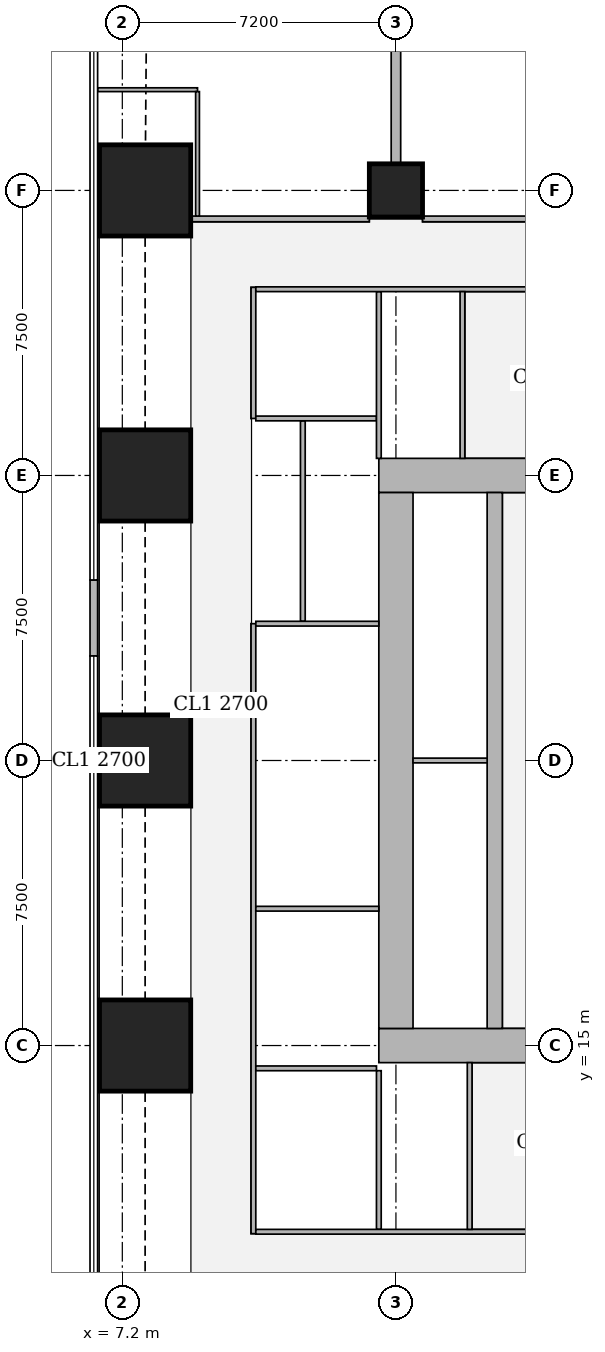
"""IFC4 building model, lengths in metres.
Left out: names, types, materials, properties, quantities, classifications, styles, units other than length and angle.
Written with IfcOpenShell. Run it as: python <this file> out.ifc"""

import sys

from ifc_helpers import new_model, si_unit, direction, frame, frame_2d, origin, origin_2d, place, context, subcontext, project, spatial, rectangle, extrude, element, fill, save


model = new_model("IFC4")
c1 = context("Model", 3, precision=1e-05, world=origin(), true_north=direction((0.0, 1.0)))
c2 = subcontext(c1, "Body", "Model", "MODEL_VIEW")
j1 = project(units=[si_unit("LENGTHUNIT", "METRE"), si_unit("PLANEANGLEUNIT", "RADIAN")], contexts=[c1])
p1 = place(None, origin())
s1 = spatial("IfcSite", under=j1, at=p1, CompositionType="ELEMENT")
p2 = place(p1, origin())
s2 = spatial("IfcBuilding", under=s1, at=p2, CompositionType="ELEMENT")
p3 = place(p2, frame((0.0, 0.0, 193.7)))
s3 = spatial("IfcBuildingStorey", under=s2, at=p3, CompositionType="ELEMENT", Elevation=193.7)
for number, where, z_axis, x_axis in (
    (1, (7.8, 15.0, 0.0), (0.0, 0.0, 1.0), (1.0, 0.0, 0.0)),
    (2, (7.8, 22.5, 0.0), (0.0, 0.0, 1.0), (1.0, 0.0, 0.0)),
    (3, (7.8, 30.0, 0.0), (0.0, 0.0, 1.0), (1.0, 0.0, 0.0)),
    (4, (7.8, 37.5, 0.0), (0.0, 0.0, 1.0), (1.0, 0.0, 0.0)),
):
    element("IfcColumn", number, at=place(p3, frame(where, z_axis=z_axis, x_axis=x_axis)), inside=s3, PredefinedType="COLUMN", context=c2, shape_type="SweptSolid", body=[
        extrude(rectangle(XDim=2.4, YDim=2.4, at=origin_2d()), origin(), (0.0, 0.0, 1.0), 3.75),
    ])
p4 = place(p3, frame((14.4, 37.5, 0.0), z_axis=(0.0, 0.0, 1.0), x_axis=(1.0, 0.0, 0.0)))
e5 = element("IfcColumn", 5, at=p4, inside=s3, PredefinedType="COLUMN", context=c2, shape_type="SweptSolid", body=[
    extrude(rectangle(XDim=1.4, YDim=1.4, at=origin_2d()), origin(), (0.0, 0.0, 1.0), 3.75),
])
p5 = place(p3, frame((13.95, 15.0, 0.0), z_axis=(0.0, 0.0, 1.0), x_axis=(1.0, 0.0, 0.0)))
e6 = element("IfcWall", 6, at=p5, inside=s3, PredefinedType="SHEAR", context=c2, shape_type="SweptSolid", body=[
    extrude(rectangle(XDim=15.3, YDim=0.9, at=frame_2d((7.65, 0.0))), origin(), (0.0, 0.0, 1.0), 3.75),
])
p6 = place(p5, frame((4.45, 0.0, 0.0)))
e7 = element("IfcOpeningElement", 7, at=p6, cuts=e6, PredefinedType="OPENING", context=c2, shape_type="SweptSolid", body=[
    extrude(rectangle(XDim=1.8, YDim=2.1, at=frame_2d((0.9, 1.05))), frame((0.0, 0.46, 0.0), z_axis=(0.0, -1.0, 0.0), x_axis=(1.0, 0.0, 0.0)), (0.0, 0.0, 1.0), 0.92),
])
p7 = place(p5, frame((10.7, 0.0, 0.0)))
e8 = element("IfcOpeningElement", 8, at=p7, cuts=e6, PredefinedType="OPENING", context=c2, shape_type="SweptSolid", body=[
    extrude(rectangle(XDim=1.1, YDim=2.1, at=frame_2d((0.55, 1.05))), frame((0.0, 0.46, 0.0), z_axis=(0.0, -1.0, 0.0), x_axis=(1.0, 0.0, 0.0)), (0.0, 0.0, 1.0), 0.92),
])
p8 = place(p3, frame((13.95, 30.0, 0.0), z_axis=(0.0, 0.0, 1.0), x_axis=(1.0, 0.0, 0.0)))
e9 = element("IfcWall", 9, at=p8, inside=s3, PredefinedType="SHEAR", context=c2, shape_type="SweptSolid", body=[
    extrude(rectangle(XDim=15.3, YDim=0.9, at=frame_2d((7.65, 0.0))), origin(), (0.0, 0.0, 1.0), 3.75),
])
p9 = place(p8, frame((4.45, 0.0, 0.0)))
e10 = element("IfcOpeningElement", 10, at=p9, cuts=e9, PredefinedType="OPENING", context=c2, shape_type="SweptSolid", body=[
    extrude(rectangle(XDim=1.8, YDim=2.1, at=frame_2d((0.9, 1.05))), frame((0.0, 0.46, 0.0), z_axis=(0.0, -1.0, 0.0), x_axis=(1.0, 0.0, 0.0)), (0.0, 0.0, 1.0), 0.92),
])
p10 = place(p8, frame((10.7, 0.0, 0.0)))
e11 = element("IfcOpeningElement", 11, at=p10, cuts=e9, PredefinedType="OPENING", context=c2, shape_type="SweptSolid", body=[
    extrude(rectangle(XDim=1.1, YDim=2.1, at=frame_2d((0.55, 1.05))), frame((0.0, 0.46, 0.0), z_axis=(0.0, -1.0, 0.0), x_axis=(1.0, 0.0, 0.0)), (0.0, 0.0, 1.0), 0.92),
])
p11 = place(p3, frame((14.4, 15.45, 0.0), z_axis=(0.0, 0.0, 1.0), x_axis=(0.0, 1.0, 0.0)))
e12 = element("IfcWall", 12, at=p11, inside=s3, PredefinedType="SHEAR", context=c2, shape_type="SweptSolid", body=[
    extrude(rectangle(XDim=14.1, YDim=0.9, at=frame_2d((7.05, 0.0))), origin(), (0.0, 0.0, 1.0), 3.75),
])
p12 = place(p3, frame((17.0, 15.45, 0.0), z_axis=(0.0, 0.0, 1.0), x_axis=(0.0, 1.0, 0.0)))
e13 = element("IfcWall", 13, at=p12, inside=s3, PredefinedType="SHEAR", context=c2, shape_type="SweptSolid", body=[
    extrude(rectangle(XDim=14.1, YDim=0.4, at=frame_2d((7.05, 0.0))), origin(), (0.0, 0.0, 1.0), 3.75),
])
p13 = place(p12, frame((0.925, 0.0, 0.0)))
e14 = element("IfcOpeningElement", 14, at=p13, cuts=e13, PredefinedType="OPENING", context=c2, shape_type="SweptSolid", body=[
    extrude(rectangle(XDim=1.0, YDim=2.1, at=frame_2d((0.5, 1.05))), frame((0.0, 0.21, 0.0), z_axis=(0.0, -1.0, 0.0), x_axis=(1.0, 0.0, 0.0)), (0.0, 0.0, 1.0), 0.42),
])
p14 = place(p12, frame((4.675, 0.0, 0.0)))
e15 = element("IfcOpeningElement", 15, at=p14, cuts=e13, PredefinedType="OPENING", context=c2, shape_type="SweptSolid", body=[
    extrude(rectangle(XDim=1.0, YDim=2.1, at=frame_2d((0.5, 1.05))), frame((0.0, 0.21, 0.0), z_axis=(0.0, -1.0, 0.0), x_axis=(1.0, 0.0, 0.0)), (0.0, 0.0, 1.0), 0.42),
])
p15 = place(p12, frame((8.425, 0.0, 0.0)))
e16 = element("IfcOpeningElement", 16, at=p15, cuts=e13, PredefinedType="OPENING", context=c2, shape_type="SweptSolid", body=[
    extrude(rectangle(XDim=1.0, YDim=2.1, at=frame_2d((0.5, 1.05))), frame((0.0, 0.21, 0.0), z_axis=(0.0, -1.0, 0.0), x_axis=(1.0, 0.0, 0.0)), (0.0, 0.0, 1.0), 0.42),
])
p16 = place(p12, frame((12.175, 0.0, 0.0)))
e17 = element("IfcOpeningElement", 17, at=p16, cuts=e13, PredefinedType="OPENING", context=c2, shape_type="SweptSolid", body=[
    extrude(rectangle(XDim=1.0, YDim=2.1, at=frame_2d((0.5, 1.05))), frame((0.0, 0.21, 0.0), z_axis=(0.0, -1.0, 0.0), x_axis=(1.0, 0.0, 0.0)), (0.0, 0.0, 1.0), 0.42),
])
p17 = place(p3, frame((6.45, 27.25, 0.0), z_axis=(0.0, 0.0, 1.0), x_axis=(0.0, -1.0, 0.0)))
e18 = element("IfcWall", 18, at=p17, inside=s3, PredefinedType="SOLIDWALL", context=c2, shape_type="SweptSolid", body=[
    extrude(rectangle(XDim=2.0, YDim=0.2, at=frame_2d((1.0, 0.0))), origin(), (0.0, 0.0, 1.0), 3.5),
])
p18 = place(p17, frame((0.5, 0.0, 0.0)))
e19 = element("IfcOpeningElement", 19, at=p18, cuts=e18, PredefinedType="OPENING", context=c2, shape_type="SweptSolid", body=[
    extrude(rectangle(XDim=1.0, YDim=2.4, at=frame_2d((0.5, 1.2))), frame((0.0, 0.11, 0.0), z_axis=(0.0, -1.0, 0.0), x_axis=(1.0, 0.0, 0.0)), (0.0, 0.0, 1.0), 0.22),
])
p19 = place(p3, frame((9.001, 36.75, 0.0), z_axis=(0.0, 0.0, 1.0), x_axis=(1.0, 0.0, 0.0)))
e20 = element("IfcWall", 20, at=p19, inside=s3, PredefinedType="SOLIDWALL", context=c2, shape_type="SweptSolid", body=[
    extrude(rectangle(XDim=4.698, YDim=0.15, at=frame_2d((2.349, 0.0))), origin(), (0.0, 0.0, 1.0), 3.5),
])
p20 = place(p19, frame((0.353, 0.0, 0.0)))
e21 = element("IfcOpeningElement", 21, at=p20, cuts=e20, PredefinedType="OPENING", context=c2, shape_type="SweptSolid", body=[
    extrude(rectangle(XDim=1.0, YDim=2.1, at=frame_2d((0.5, 1.05))), frame((0.0, 0.085, 0.0), z_axis=(0.0, -1.0, 0.0), x_axis=(1.0, 0.0, 0.0)), (0.0, 0.0, 1.0), 0.17),
])
p21 = place(p3, frame((15.101, 36.75, 0.0), z_axis=(0.0, 0.0, 1.0), x_axis=(1.0, 0.0, 0.0)))
e22 = element("IfcWall", 22, at=p21, inside=s3, PredefinedType="SOLIDWALL", context=c2, shape_type="SweptSolid", body=[
    extrude(rectangle(XDim=5.798, YDim=0.15, at=frame_2d((2.899, 0.0))), origin(), (0.0, 0.0, 1.0), 3.5),
])
p22 = place(p21, frame((0.799, 0.0, 0.0)))
e23 = element("IfcOpeningElement", 23, at=p22, cuts=e22, PredefinedType="OPENING", context=c2, shape_type="SweptSolid", body=[
    extrude(rectangle(XDim=1.0, YDim=2.1, at=frame_2d((0.5, 1.05))), frame((0.0, 0.085, 0.0), z_axis=(0.0, -1.0, 0.0), x_axis=(1.0, 0.0, 0.0)), (0.0, 0.0, 1.0), 0.17),
])
p23 = place(p3, frame((6.55, 40.15, 0.0), z_axis=(0.0, 0.0, 1.0), x_axis=(1.0, 0.0, 0.0)))
e24 = element("IfcWall", 24, at=p23, inside=s3, PredefinedType="PARTITIONING", context=c2, shape_type="SweptSolid", body=[
    extrude(rectangle(XDim=2.629, YDim=0.1, at=frame_2d((1.314, 0.0))), origin(), (0.0, 0.0, 1.0), 2.05),
])
p24 = place(p3, frame((9.179, 36.825, 0.0), z_axis=(0.0, 0.0, 1.0), x_axis=(0.0, 1.0, 0.0)))
e25 = element("IfcWall", 25, at=p24, inside=s3, PredefinedType="PARTITIONING", context=c2, shape_type="SweptSolid", body=[
    extrude(rectangle(XDim=3.275, YDim=0.1, at=frame_2d((1.638, 0.0))), origin(), (0.0, 0.0, 1.0), 3.5),
])
p25 = place(p24, frame((2.225, 0.0, 0.0)))
e26 = element("IfcOpeningElement", 26, at=p25, cuts=e25, PredefinedType="OPENING", context=c2, shape_type="SweptSolid", body=[
    extrude(rectangle(XDim=0.9, YDim=2.1, at=frame_2d((0.45, 1.05))), frame((0.0, 0.06, 0.0), z_axis=(0.0, -1.0, 0.0), x_axis=(1.0, 0.0, 0.0)), (0.0, 0.0, 1.0), 0.12),
])
p26 = place(p3, frame((14.4, 38.201, 0.0), z_axis=(0.0, 0.0, 1.0), x_axis=(0.0, 1.0, 0.0)))
e27 = element("IfcWall", 27, at=p26, inside=s3, PredefinedType="SOLIDWALL", context=c2, shape_type="SweptSolid", body=[
    extrude(rectangle(XDim=3.149, YDim=0.25, at=frame_2d((1.575, 0.0))), origin(), (0.0, 0.0, 1.0), 3.5),
])
p27 = place(p3, frame((10.65, 10.05, 0.0), z_axis=(0.0, 0.0, 1.0), x_axis=(0.0, 1.0, 0.0)))
e28 = element("IfcWall", 28, at=p27, inside=s3, PredefinedType="PARTITIONING", context=c2, shape_type="SweptSolid", body=[
    extrude(rectangle(XDim=16.05, YDim=0.125, at=frame_2d((8.025, 0.0))), origin(), (0.0, 0.0, 1.0), 3.5),
])
p28 = place(p27, frame((1.675, 0.0, 0.0)))
e29 = element("IfcOpeningElement", 29, at=p28, cuts=e28, PredefinedType="OPENING", context=c2, shape_type="SweptSolid", body=[
    extrude(rectangle(XDim=1.0, YDim=2.1, at=frame_2d((0.5, 1.05))), frame((0.0, 0.073, 0.0), z_axis=(0.0, -1.0, 0.0), x_axis=(1.0, 0.0, 0.0)), (0.0, 0.0, 1.0), 0.145),
])
p29 = place(p27, frame((5.95, 0.0, 0.0)))
e30 = element("IfcOpeningElement", 30, at=p29, cuts=e28, PredefinedType="OPENING", context=c2, shape_type="SweptSolid", body=[
    extrude(rectangle(XDim=1.0, YDim=2.1, at=frame_2d((0.5, 1.05))), frame((0.0, 0.073, 0.0), z_axis=(0.0, -1.0, 0.0), x_axis=(1.0, 0.0, 0.0)), (0.0, 0.0, 1.0), 0.145),
])
p30 = place(p27, frame((11.8, 0.0, 0.0)))
e31 = element("IfcOpeningElement", 31, at=p30, cuts=e28, PredefinedType="OPENING", context=c2, shape_type="SweptSolid", body=[
    extrude(rectangle(XDim=1.0, YDim=2.1, at=frame_2d((0.5, 1.05))), frame((0.0, 0.073, 0.0), z_axis=(0.0, -1.0, 0.0), x_axis=(1.0, 0.0, 0.0)), (0.0, 0.0, 1.0), 0.145),
])
p31 = place(p3, frame((10.65, 31.5, 0.0), z_axis=(0.0, 0.0, 1.0), x_axis=(0.0, 1.0, 0.0)))
e32 = element("IfcWall", 32, at=p31, inside=s3, PredefinedType="PARTITIONING", context=c2, shape_type="SweptSolid", body=[
    extrude(rectangle(XDim=3.45, YDim=0.125, at=frame_2d((1.725, 0.0))), origin(), (0.0, 0.0, 1.0), 3.5),
])
p32 = place(p31, frame((1.225, 0.0, 0.0)))
e33 = element("IfcOpeningElement", 33, at=p32, cuts=e32, PredefinedType="OPENING", context=c2, shape_type="SweptSolid", body=[
    extrude(rectangle(XDim=1.0, YDim=2.1, at=frame_2d((0.5, 1.05))), frame((0.0, 0.073, 0.0), z_axis=(0.0, -1.0, 0.0), x_axis=(1.0, 0.0, 0.0)), (0.0, 0.0, 1.0), 0.145),
])
p33 = place(p3, frame((11.95, 26.163, 0.0), z_axis=(0.0, 0.0, 1.0), x_axis=(0.0, 1.0, 0.0)))
e34 = element("IfcWall", 34, at=p33, inside=s3, PredefinedType="PARTITIONING", context=c2, shape_type="SweptSolid", body=[
    extrude(rectangle(XDim=5.275, YDim=0.125, at=frame_2d((2.637, 0.0))), origin(), (0.0, 0.0, 1.0), 3.5),
])
p34 = place(p33, frame((2.137, 0.0, 0.0)))
e35 = element("IfcOpeningElement", 35, at=p34, cuts=e34, PredefinedType="OPENING", context=c2, shape_type="SweptSolid", body=[
    extrude(rectangle(XDim=1.0, YDim=2.1, at=frame_2d((0.5, 1.05))), frame((0.0, 0.073, 0.0), z_axis=(0.0, -1.0, 0.0), x_axis=(1.0, 0.0, 0.0)), (0.0, 0.0, 1.0), 0.145),
])
p35 = place(p3, frame((10.713, 14.4, 0.0), z_axis=(0.0, 0.0, 1.0), x_axis=(1.0, 0.0, 0.0)))
e36 = element("IfcWall", 36, at=p35, inside=s3, PredefinedType="PARTITIONING", context=c2, shape_type="SweptSolid", body=[
    extrude(rectangle(XDim=3.175, YDim=0.125, at=frame_2d((1.587, 0.0))), origin(), (0.0, 0.0, 1.0), 3.5),
])
for number, where, z_axis, x_axis in (
    (37, (10.713, 18.6, 0.0), (0.0, 0.0, 1.0), (1.0, 0.0, 0.0)),
    (38, (10.713, 26.1, 0.0), (0.0, 0.0, 1.0), (1.0, 0.0, 0.0)),
):
    element("IfcWall", number, at=place(p3, frame(where, z_axis=z_axis, x_axis=x_axis)), inside=s3, PredefinedType="PARTITIONING", context=c2, shape_type="SweptSolid", body=[
        extrude(rectangle(XDim=3.237, YDim=0.125, at=frame_2d((1.619, 0.0))), origin(), (0.0, 0.0, 1.0), 3.5),
    ])
p36 = place(p3, frame((10.713, 31.5, 0.0), z_axis=(0.0, 0.0, 1.0), x_axis=(1.0, 0.0, 0.0)))
e39 = element("IfcWall", 39, at=p36, inside=s3, PredefinedType="PARTITIONING", context=c2, shape_type="SweptSolid", body=[
    extrude(rectangle(XDim=3.175, YDim=0.125, at=frame_2d((1.587, 0.0))), origin(), (0.0, 0.0, 1.0), 3.5),
])
p37 = place(p3, frame((13.95, 10.163, 0.0), z_axis=(0.0, 0.0, 1.0), x_axis=(0.0, 1.0, 0.0)))
e40 = element("IfcWall", 40, at=p37, inside=s3, PredefinedType="PARTITIONING", context=c2, shape_type="SweptSolid", body=[
    extrude(rectangle(XDim=4.175, YDim=0.125, at=frame_2d((2.087, 0.0))), origin(), (0.0, 0.0, 1.0), 3.5),
])
p38 = place(p3, frame((13.95, 30.45, 0.0), z_axis=(0.0, 0.0, 1.0), x_axis=(0.0, 1.0, 0.0)))
e41 = element("IfcWall", 41, at=p38, inside=s3, PredefinedType="PARTITIONING", context=c2, shape_type="SweptSolid", body=[
    extrude(rectangle(XDim=4.387, YDim=0.125, at=frame_2d((2.193, 0.0))), origin(), (0.0, 0.0, 1.0), 3.5),
])
p39 = place(p3, frame((10.713, 10.1, 0.0), z_axis=(0.0, 0.0, 1.0), x_axis=(1.0, 0.0, 0.0)))
e42 = element("IfcWall", 42, at=p39, inside=s3, PredefinedType="PARTITIONING", context=c2, shape_type="SweptSolid", body=[
    extrude(rectangle(XDim=10.737, YDim=0.125, at=frame_2d((5.369, 0.0))), origin(), (0.0, 0.0, 1.0), 3.5),
])
p40 = place(p39, frame((7.282, 0.0, 0.0)))
e43 = element("IfcOpeningElement", 43, at=p40, cuts=e42, PredefinedType="OPENING", context=c2, shape_type="SweptSolid", body=[
    extrude(rectangle(XDim=1.8, YDim=2.1, at=frame_2d((0.9, 1.05))), frame((0.0, 0.073, 0.0), z_axis=(0.0, -1.0, 0.0), x_axis=(1.0, 0.0, 0.0)), (0.0, 0.0, 1.0), 0.145),
])
p41 = place(p3, frame((10.713, 34.9, 0.0), z_axis=(0.0, 0.0, 1.0), x_axis=(1.0, 0.0, 0.0)))
e44 = element("IfcWall", 44, at=p41, inside=s3, PredefinedType="PARTITIONING", context=c2, shape_type="SweptSolid", body=[
    extrude(rectangle(XDim=10.737, YDim=0.125, at=frame_2d((5.369, 0.0))), origin(), (0.0, 0.0, 1.0), 3.5),
])
p42 = place(p41, frame((7.187, 0.0, 0.0)))
e45 = element("IfcOpeningElement", 45, at=p42, cuts=e44, PredefinedType="OPENING", context=c2, shape_type="SweptSolid", body=[
    extrude(rectangle(XDim=1.8, YDim=2.1, at=frame_2d((0.9, 1.05))), frame((0.0, 0.073, 0.0), z_axis=(0.0, -1.0, 0.0), x_axis=(1.0, 0.0, 0.0)), (0.0, 0.0, 1.0), 0.145),
])
p43 = place(p3, frame((16.34, 10.163, 0.0), z_axis=(0.0, 0.0, 1.0), x_axis=(0.0, 1.0, 0.0)))
e46 = element("IfcWall", 46, at=p43, inside=s3, PredefinedType="PARTITIONING", context=c2, shape_type="SweptSolid", body=[
    extrude(rectangle(XDim=4.387, YDim=0.125, at=frame_2d((2.193, 0.0))), origin(), (0.0, 0.0, 1.0), 3.5),
])
p44 = place(p43, frame((1.637, 0.0, 0.0)))
e47 = element("IfcOpeningElement", 47, at=p44, cuts=e46, PredefinedType="OPENING", context=c2, shape_type="SweptSolid", body=[
    extrude(rectangle(XDim=1.0, YDim=2.1, at=frame_2d((0.5, 1.05))), frame((0.0, 0.073, 0.0), z_axis=(0.0, -1.0, 0.0), x_axis=(1.0, 0.0, 0.0)), (0.0, 0.0, 1.0), 0.145),
])
p45 = place(p3, frame((16.15, 30.45, 0.0), z_axis=(0.0, 0.0, 1.0), x_axis=(0.0, 1.0, 0.0)))
e48 = element("IfcWall", 48, at=p45, inside=s3, PredefinedType="PARTITIONING", context=c2, shape_type="SweptSolid", body=[
    extrude(rectangle(XDim=4.387, YDim=0.125, at=frame_2d((2.193, 0.0))), origin(), (0.0, 0.0, 1.0), 3.5),
])
p46 = place(p45, frame((1.75, 0.0, 0.0)))
e49 = element("IfcOpeningElement", 49, at=p46, cuts=e48, PredefinedType="OPENING", context=c2, shape_type="SweptSolid", body=[
    extrude(rectangle(XDim=1.0, YDim=2.1, at=frame_2d((0.5, 1.05))), frame((0.0, 0.073, 0.0), z_axis=(0.0, -1.0, 0.0), x_axis=(1.0, 0.0, 0.0)), (0.0, 0.0, 1.0), 0.145),
])
p47 = place(p3, frame((14.85, 22.5, 0.0), z_axis=(0.0, 0.0, 1.0), x_axis=(1.0, 0.0, 0.0)))
e50 = element("IfcWall", 50, at=p47, inside=s3, PredefinedType="PARTITIONING", context=c2, shape_type="SweptSolid", body=[
    extrude(rectangle(XDim=1.95, YDim=0.125, at=frame_2d((0.975, 0.0))), origin(), (0.0, 0.0, 1.0), 3.5),
])
p48 = place(p18, origin())
e51 = element("IfcDoor", 51, at=p48, inside=s3, OperationType="SINGLE_SWING_RIGHT", PredefinedType="DOOR", context=c2, shape_type="SweptSolid", body=[
    extrude(rectangle(XDim=1.0, YDim=2.4, at=frame_2d((0.5, 1.2))), frame((0.0, 0.025, 0.0), z_axis=(0.0, -1.0, 0.0), x_axis=(1.0, 0.0, 0.0)), (0.0, 0.0, 1.0), 0.05),
])
fill(e19, e51)
p49 = place(p25, origin())
e52 = element("IfcDoor", 52, at=p49, inside=s3, OperationType="SINGLE_SWING_RIGHT", PredefinedType="DOOR", context=c2, shape_type="SweptSolid", body=[
    extrude(rectangle(XDim=0.9, YDim=2.1, at=frame_2d((0.45, 1.05))), frame((0.0, 0.025, 0.0), z_axis=(0.0, -1.0, 0.0), x_axis=(1.0, 0.0, 0.0)), (0.0, 0.0, 1.0), 0.05),
])
fill(e26, e52)
p50 = place(p20, origin())
e53 = element("IfcDoor", 53, at=p50, inside=s3, OperationType="SINGLE_SWING_RIGHT", PredefinedType="DOOR", context=c2, shape_type="SweptSolid", body=[
    extrude(rectangle(XDim=1.0, YDim=2.1, at=frame_2d((0.5, 1.05))), frame((0.0, 0.025, 0.0), z_axis=(0.0, -1.0, 0.0), x_axis=(1.0, 0.0, 0.0)), (0.0, 0.0, 1.0), 0.05),
])
fill(e21, e53)
p51 = place(p22, origin())
e54 = element("IfcDoor", 54, at=p51, inside=s3, OperationType="SINGLE_SWING_LEFT", PredefinedType="DOOR", context=c2, shape_type="SweptSolid", body=[
    extrude(rectangle(XDim=1.0, YDim=2.1, at=frame_2d((0.5, 1.05))), frame((0.0, 0.025, 0.0), z_axis=(0.0, -1.0, 0.0), x_axis=(1.0, 0.0, 0.0)), (0.0, 0.0, 1.0), 0.05),
])
fill(e23, e54)
p52 = place(p28, origin())
e55 = element("IfcDoor", 55, at=p52, inside=s3, OperationType="SINGLE_SWING_RIGHT", PredefinedType="DOOR", context=c2, shape_type="SweptSolid", body=[
    extrude(rectangle(XDim=1.0, YDim=2.1, at=frame_2d((0.5, 1.05))), frame((0.0, 0.025, 0.0), z_axis=(0.0, -1.0, 0.0), x_axis=(1.0, 0.0, 0.0)), (0.0, 0.0, 1.0), 0.05),
])
fill(e29, e55)
p53 = place(p29, origin())
e56 = element("IfcDoor", 56, at=p53, inside=s3, OperationType="SINGLE_SWING_RIGHT", PredefinedType="DOOR", context=c2, shape_type="SweptSolid", body=[
    extrude(rectangle(XDim=1.0, YDim=2.1, at=frame_2d((0.5, 1.05))), frame((0.0, 0.025, 0.0), z_axis=(0.0, -1.0, 0.0), x_axis=(1.0, 0.0, 0.0)), (0.0, 0.0, 1.0), 0.05),
])
fill(e30, e56)
p54 = place(p30, origin())
e57 = element("IfcDoor", 57, at=p54, inside=s3, OperationType="SINGLE_SWING_LEFT", PredefinedType="DOOR", context=c2, shape_type="SweptSolid", body=[
    extrude(rectangle(XDim=1.0, YDim=2.1, at=frame_2d((0.5, 1.05))), frame((0.0, 0.025, 0.0), z_axis=(0.0, -1.0, 0.0), x_axis=(1.0, 0.0, 0.0)), (0.0, 0.0, 1.0), 0.05),
])
fill(e31, e57)
p55 = place(p34, origin())
e58 = element("IfcDoor", 58, at=p55, inside=s3, OperationType="SINGLE_SWING_RIGHT", PredefinedType="DOOR", context=c2, shape_type="SweptSolid", body=[
    extrude(rectangle(XDim=1.0, YDim=2.1, at=frame_2d((0.5, 1.05))), frame((0.0, 0.025, 0.0), z_axis=(0.0, -1.0, 0.0), x_axis=(1.0, 0.0, 0.0)), (0.0, 0.0, 1.0), 0.05),
])
fill(e35, e58)
p56 = place(p32, origin())
e59 = element("IfcDoor", 59, at=p56, inside=s3, OperationType="SINGLE_SWING_LEFT", PredefinedType="DOOR", context=c2, shape_type="SweptSolid", body=[
    extrude(rectangle(XDim=1.0, YDim=2.1, at=frame_2d((0.5, 1.05))), frame((0.0, 0.025, 0.0), z_axis=(0.0, -1.0, 0.0), x_axis=(1.0, 0.0, 0.0)), (0.0, 0.0, 1.0), 0.05),
])
fill(e33, e59)
p57 = place(p44, origin())
e60 = element("IfcDoor", 60, at=p57, inside=s3, OperationType="SINGLE_SWING_LEFT", PredefinedType="DOOR", context=c2, shape_type="SweptSolid", body=[
    extrude(rectangle(XDim=1.0, YDim=2.1, at=frame_2d((0.5, 1.05))), frame((0.0, 0.025, 0.0), z_axis=(0.0, -1.0, 0.0), x_axis=(1.0, 0.0, 0.0)), (0.0, 0.0, 1.0), 0.05),
])
fill(e47, e60)
p58 = place(p46, origin())
e61 = element("IfcDoor", 61, at=p58, inside=s3, OperationType="SINGLE_SWING_RIGHT", PredefinedType="DOOR", context=c2, shape_type="SweptSolid", body=[
    extrude(rectangle(XDim=1.0, YDim=2.1, at=frame_2d((0.5, 1.05))), frame((0.0, 0.025, 0.0), z_axis=(0.0, -1.0, 0.0), x_axis=(1.0, 0.0, 0.0)), (0.0, 0.0, 1.0), 0.05),
])
fill(e49, e61)
p59 = place(p13, origin())
e62 = element("IfcDoor", 62, at=p59, inside=s3, OperationType="SINGLE_SWING_LEFT", PredefinedType="DOOR", context=c2, shape_type="SweptSolid", body=[
    extrude(rectangle(XDim=1.0, YDim=2.1, at=frame_2d((0.5, 1.05))), frame((0.0, 0.025, 0.0), z_axis=(0.0, -1.0, 0.0), x_axis=(1.0, 0.0, 0.0)), (0.0, 0.0, 1.0), 0.05),
])
fill(e14, e62)
p60 = place(p14, origin())
e63 = element("IfcDoor", 63, at=p60, inside=s3, OperationType="SINGLE_SWING_RIGHT", PredefinedType="DOOR", context=c2, shape_type="SweptSolid", body=[
    extrude(rectangle(XDim=1.0, YDim=2.1, at=frame_2d((0.5, 1.05))), frame((0.0, 0.025, 0.0), z_axis=(0.0, -1.0, 0.0), x_axis=(1.0, 0.0, 0.0)), (0.0, 0.0, 1.0), 0.05),
])
fill(e15, e63)
p61 = place(p15, origin())
e64 = element("IfcDoor", 64, at=p61, inside=s3, OperationType="SINGLE_SWING_LEFT", PredefinedType="DOOR", context=c2, shape_type="SweptSolid", body=[
    extrude(rectangle(XDim=1.0, YDim=2.1, at=frame_2d((0.5, 1.05))), frame((0.0, 0.025, 0.0), z_axis=(0.0, -1.0, 0.0), x_axis=(1.0, 0.0, 0.0)), (0.0, 0.0, 1.0), 0.05),
])
fill(e16, e64)
p62 = place(p16, origin())
e65 = element("IfcDoor", 65, at=p62, inside=s3, OperationType="SINGLE_SWING_RIGHT", PredefinedType="DOOR", context=c2, shape_type="SweptSolid", body=[
    extrude(rectangle(XDim=1.0, YDim=2.1, at=frame_2d((0.5, 1.05))), frame((0.0, 0.025, 0.0), z_axis=(0.0, -1.0, 0.0), x_axis=(1.0, 0.0, 0.0)), (0.0, 0.0, 1.0), 0.05),
])
fill(e17, e65)
save(model, sys.argv[1])
